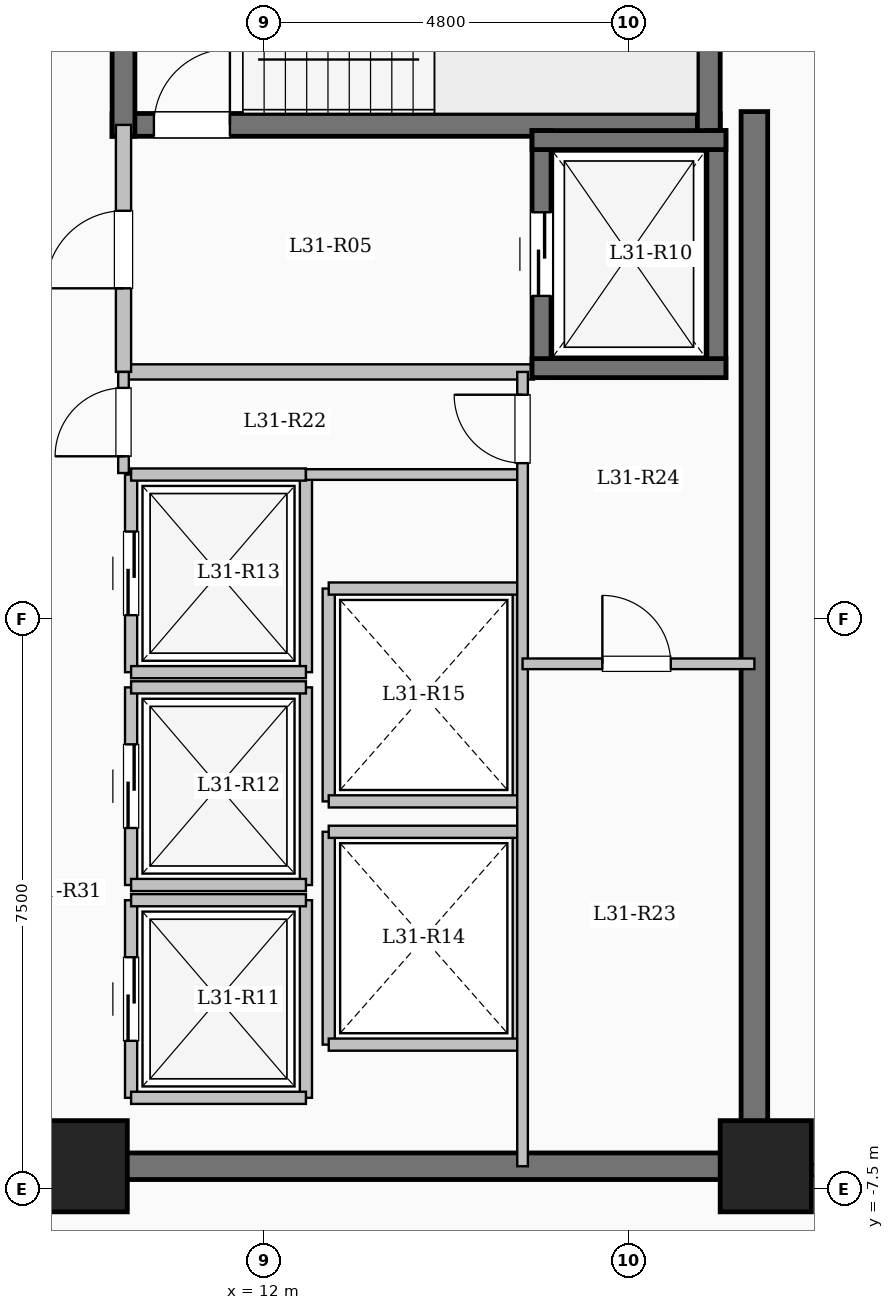
"""IFC4 building model, lengths in metres.
Left out: names, types, materials, properties, quantities, classifications, styles, units other than length and angle.
Written with IfcOpenShell. Run it as: python <this file> out.ifc"""

import sys

from ifc_helpers import new_model, si_unit, direction, frame, frame_2d, origin, origin_2d, place, context, subcontext, project, spatial, rectangle, extrude, element, fill, save


model = new_model("IFC4")
c1 = context("Model", 3, precision=1e-05, world=origin(), true_north=direction((0.0, 1.0)))
c2 = subcontext(c1, "Body", "Model", "MODEL_VIEW")
j1 = project(units=[si_unit("LENGTHUNIT", "METRE"), si_unit("PLANEANGLEUNIT", "RADIAN")], contexts=[c1])
p1 = place(None, origin())
s1 = spatial("IfcSite", under=j1, at=p1, CompositionType="ELEMENT")
p2 = place(p1, origin())
s2 = spatial("IfcBuilding", under=s1, at=p2, CompositionType="ELEMENT")
p3 = place(p2, frame((0.0, 0.0, 115.15)))
s3 = spatial("IfcBuildingStorey", under=s2, at=p3, CompositionType="ELEMENT", Elevation=115.15)
for number, where, z_axis, x_axis in (
    (1, (9.6, -7.2, 0.0), (0.0, 0.0, 1.0), (1.0, 0.0, 0.0)),
    (2, (18.6, -7.2, 0.0), (0.0, 0.0, 1.0), (1.0, 0.0, 0.0)),
):
    element("IfcColumn", number, at=place(p3, frame(where, z_axis=z_axis, x_axis=x_axis)), inside=s3, PredefinedType="COLUMN", context=c2, shape_type="SweptSolid", body=[
        extrude(rectangle(XDim=1.2, YDim=1.2, at=origin_2d()), origin(), (0.0, 0.0, 1.0), 3.35),
    ])
p4 = place(p3, frame((10.0, 6.5, 0.0), z_axis=(0.0, 0.0, 1.0), x_axis=(1.0, 0.0, 0.0)))
e3 = element("IfcWall", 3, at=p4, inside=s3, PredefinedType="SHEAR", context=c2, shape_type="SweptSolid", body=[
    extrude(rectangle(XDim=8.0, YDim=0.3, at=frame_2d((4.0, 0.0))), origin(), (0.0, 0.0, 1.0), 3.35),
])
p5 = place(p4, frame((0.55, 0.0, 0.0)))
e4 = element("IfcOpeningElement", 4, at=p5, cuts=e3, PredefinedType="OPENING", context=c2, shape_type="SweptSolid", body=[
    extrude(rectangle(XDim=1.0, YDim=2.15, at=frame_2d((0.5, 1.075))), frame((0.0, 0.16, 0.0), z_axis=(0.0, -1.0, 0.0), x_axis=(1.0, 0.0, 0.0)), (0.0, 0.0, 1.0), 0.32),
])
for number, where, z_axis, x_axis in (
    (5, (10.15, 6.35, 0.0), (0.0, 0.0, 1.0), (0.0, 1.0, 0.0)),
    (6, (17.85, 6.35, 0.0), (0.0, 0.0, 1.0), (0.0, 1.0, 0.0)),
):
    element("IfcWall", number, at=place(p3, frame(where, z_axis=z_axis, x_axis=x_axis)), inside=s3, PredefinedType="SHEAR", context=c2, shape_type="SweptSolid", body=[
        extrude(rectangle(XDim=3.59, YDim=0.3, at=frame_2d((1.795, 0.0))), origin(), (0.0, 0.0, 1.0), 3.35),
    ])
p6 = place(p3, frame((10.15, 3.25, 0.0), z_axis=(0.0, 0.0, 1.0), x_axis=(1.0, 0.0, 0.0)))
e7 = element("IfcWall", 7, at=p6, inside=s3, PredefinedType="SOLIDWALL", context=c2, shape_type="SweptSolid", body=[
    extrude(rectangle(XDim=5.4, YDim=0.2, at=frame_2d((2.7, 0.0))), origin(), (0.0, 0.0, 1.0), 3.05),
])
p7 = place(p3, frame((10.15, 3.25, 0.0), z_axis=(0.0, 0.0, 1.0), x_axis=(0.0, 1.0, 0.0)))
e8 = element("IfcWall", 8, at=p7, inside=s3, PredefinedType="SOLIDWALL", context=c2, shape_type="SweptSolid", body=[
    extrude(rectangle(XDim=3.25, YDim=0.2, at=frame_2d((1.625, 0.0))), origin(), (0.0, 0.0, 1.0), 3.05),
])
p8 = place(p7, frame((1.1, 0.0, 0.0)))
e9 = element("IfcOpeningElement", 9, at=p8, cuts=e8, PredefinedType="OPENING", context=c2, shape_type="SweptSolid", body=[
    extrude(rectangle(XDim=1.02, YDim=2.15, at=frame_2d((0.51, 1.075))), frame((0.0, 0.11, 0.0), z_axis=(0.0, -1.0, 0.0), x_axis=(1.0, 0.0, 0.0)), (0.0, 0.0, 1.0), 0.22),
])
p9 = place(p3, frame((15.65, 3.175, 0.0), z_axis=(0.0, 0.0, 1.0), x_axis=(0.0, 1.0, 0.0)))
e10 = element("IfcWall", 10, at=p9, inside=s3, PredefinedType="SHEAR", context=c2, shape_type="SweptSolid", body=[
    extrude(rectangle(XDim=3.25, YDim=0.25, at=frame_2d((1.625, 0.0))), origin(), (0.0, 0.0, 1.0), 3.35),
])
p10 = place(p9, frame((1.075, 0.0, 0.0)))
e11 = element("IfcOpeningElement", 11, at=p10, cuts=e10, PredefinedType="OPENING", context=c2, shape_type="SweptSolid", body=[
    extrude(rectangle(XDim=1.1, YDim=2.15, at=frame_2d((0.55, 1.075))), frame((0.0, 0.135, 0.0), z_axis=(0.0, -1.0, 0.0), x_axis=(1.0, 0.0, 0.0)), (0.0, 0.0, 1.0), 0.27),
])
p11 = place(p3, frame((17.95, 3.175, 0.0), z_axis=(0.0, 0.0, 1.0), x_axis=(0.0, 1.0, 0.0)))
e12 = element("IfcWall", 12, at=p11, inside=s3, PredefinedType="SHEAR", context=c2, shape_type="SweptSolid", body=[
    extrude(rectangle(XDim=3.25, YDim=0.25, at=frame_2d((1.625, 0.0))), origin(), (0.0, 0.0, 1.0), 3.35),
])
for number, where, z_axis, x_axis in (
    (13, (15.525, 3.3, 0.0), (0.0, 0.0, 1.0), (1.0, 0.0, 0.0)),
    (14, (15.525, 6.3, 0.0), (0.0, 0.0, 1.0), (1.0, 0.0, 0.0)),
):
    element("IfcWall", number, at=place(p3, frame(where, z_axis=z_axis, x_axis=x_axis)), inside=s3, PredefinedType="SHEAR", context=c2, shape_type="SweptSolid", body=[
        extrude(rectangle(XDim=2.55, YDim=0.25, at=frame_2d((1.275, 0.0))), origin(), (0.0, 0.0, 1.0), 3.35),
    ])
p12 = place(p3, frame((10.25, -6.3, 0.0), z_axis=(0.0, 0.0, 1.0), x_axis=(0.0, 1.0, 0.0)))
e15 = element("IfcWall", 15, at=p12, inside=s3, PredefinedType="SOLIDWALL", context=c2, shape_type="SweptSolid", body=[
    extrude(rectangle(XDim=2.6, YDim=0.16, at=frame_2d((1.3, 0.0))), origin(), (0.0, 0.0, 1.0), 3.05),
])
p13 = place(p12, frame((0.75, 0.0, 0.0)))
e16 = element("IfcOpeningElement", 16, at=p13, cuts=e15, PredefinedType="OPENING", context=c2, shape_type="SweptSolid", body=[
    extrude(rectangle(XDim=1.1, YDim=2.15, at=frame_2d((0.55, 1.075))), frame((0.0, 0.09, 0.0), z_axis=(0.0, -1.0, 0.0), x_axis=(1.0, 0.0, 0.0)), (0.0, 0.0, 1.0), 0.18),
])
p14 = place(p3, frame((12.55, -6.3, 0.0), z_axis=(0.0, 0.0, 1.0), x_axis=(0.0, 1.0, 0.0)))
e17 = element("IfcWall", 17, at=p14, inside=s3, PredefinedType="SOLIDWALL", context=c2, shape_type="SweptSolid", body=[
    extrude(rectangle(XDim=2.6, YDim=0.16, at=frame_2d((1.3, 0.0))), origin(), (0.0, 0.0, 1.0), 3.05),
])
for number, where, z_axis, x_axis in (
    (18, (10.25, -6.3, 0.0), (0.0, 0.0, 1.0), (1.0, 0.0, 0.0)),
    (19, (10.25, -3.7, 0.0), (0.0, 0.0, 1.0), (1.0, 0.0, 0.0)),
):
    element("IfcWall", number, at=place(p3, frame(where, z_axis=z_axis, x_axis=x_axis)), inside=s3, PredefinedType="SOLIDWALL", context=c2, shape_type="SweptSolid", body=[
        extrude(rectangle(XDim=2.3, YDim=0.16, at=frame_2d((1.15, 0.0))), origin(), (0.0, 0.0, 1.0), 3.05),
    ])
p15 = place(p3, frame((10.25, -3.5, 0.0), z_axis=(0.0, 0.0, 1.0), x_axis=(0.0, 1.0, 0.0)))
e20 = element("IfcWall", 20, at=p15, inside=s3, PredefinedType="SOLIDWALL", context=c2, shape_type="SweptSolid", body=[
    extrude(rectangle(XDim=2.6, YDim=0.16, at=frame_2d((1.3, 0.0))), origin(), (0.0, 0.0, 1.0), 3.05),
])
p16 = place(p15, frame((0.75, 0.0, 0.0)))
e21 = element("IfcOpeningElement", 21, at=p16, cuts=e20, PredefinedType="OPENING", context=c2, shape_type="SweptSolid", body=[
    extrude(rectangle(XDim=1.1, YDim=2.15, at=frame_2d((0.55, 1.075))), frame((0.0, 0.09, 0.0), z_axis=(0.0, -1.0, 0.0), x_axis=(1.0, 0.0, 0.0)), (0.0, 0.0, 1.0), 0.18),
])
p17 = place(p3, frame((12.55, -3.5, 0.0), z_axis=(0.0, 0.0, 1.0), x_axis=(0.0, 1.0, 0.0)))
e22 = element("IfcWall", 22, at=p17, inside=s3, PredefinedType="SOLIDWALL", context=c2, shape_type="SweptSolid", body=[
    extrude(rectangle(XDim=2.6, YDim=0.16, at=frame_2d((1.3, 0.0))), origin(), (0.0, 0.0, 1.0), 3.05),
])
for number, where, z_axis, x_axis in (
    (23, (10.25, -3.5, 0.0), (0.0, 0.0, 1.0), (1.0, 0.0, 0.0)),
    (24, (10.25, -0.9, 0.0), (0.0, 0.0, 1.0), (1.0, 0.0, 0.0)),
):
    element("IfcWall", number, at=place(p3, frame(where, z_axis=z_axis, x_axis=x_axis)), inside=s3, PredefinedType="SOLIDWALL", context=c2, shape_type="SweptSolid", body=[
        extrude(rectangle(XDim=2.3, YDim=0.16, at=frame_2d((1.15, 0.0))), origin(), (0.0, 0.0, 1.0), 3.05),
    ])
p18 = place(p3, frame((10.25, -0.7, 0.0), z_axis=(0.0, 0.0, 1.0), x_axis=(0.0, 1.0, 0.0)))
e25 = element("IfcWall", 25, at=p18, inside=s3, PredefinedType="SOLIDWALL", context=c2, shape_type="SweptSolid", body=[
    extrude(rectangle(XDim=2.6, YDim=0.16, at=frame_2d((1.3, 0.0))), origin(), (0.0, 0.0, 1.0), 3.05),
])
p19 = place(p18, frame((0.75, 0.0, 0.0)))
e26 = element("IfcOpeningElement", 26, at=p19, cuts=e25, PredefinedType="OPENING", context=c2, shape_type="SweptSolid", body=[
    extrude(rectangle(XDim=1.1, YDim=2.15, at=frame_2d((0.55, 1.075))), frame((0.0, 0.09, 0.0), z_axis=(0.0, -1.0, 0.0), x_axis=(1.0, 0.0, 0.0)), (0.0, 0.0, 1.0), 0.18),
])
p20 = place(p3, frame((12.55, -0.7, 0.0), z_axis=(0.0, 0.0, 1.0), x_axis=(0.0, 1.0, 0.0)))
e27 = element("IfcWall", 27, at=p20, inside=s3, PredefinedType="SOLIDWALL", context=c2, shape_type="SweptSolid", body=[
    extrude(rectangle(XDim=2.6, YDim=0.16, at=frame_2d((1.3, 0.0))), origin(), (0.0, 0.0, 1.0), 3.05),
])
for number, where, z_axis, x_axis in (
    (28, (10.25, -0.7, 0.0), (0.0, 0.0, 1.0), (1.0, 0.0, 0.0)),
    (29, (10.25, 1.9, 0.0), (0.0, 0.0, 1.0), (1.0, 0.0, 0.0)),
):
    element("IfcWall", number, at=place(p3, frame(where, z_axis=z_axis, x_axis=x_axis)), inside=s3, PredefinedType="SOLIDWALL", context=c2, shape_type="SweptSolid", body=[
        extrude(rectangle(XDim=2.3, YDim=0.16, at=frame_2d((1.15, 0.0))), origin(), (0.0, 0.0, 1.0), 3.05),
    ])
for number, where, z_axis, x_axis in (
    (30, (12.85, -5.6, 0.0), (0.0, 0.0, 1.0), (0.0, 1.0, 0.0)),
    (31, (15.35, -5.6, 0.0), (0.0, 0.0, 1.0), (0.0, 1.0, 0.0)),
):
    element("IfcWall", number, at=place(p3, frame(where, z_axis=z_axis, x_axis=x_axis)), inside=s3, PredefinedType="SOLIDWALL", context=c2, shape_type="SweptSolid", body=[
        extrude(rectangle(XDim=2.8, YDim=0.16, at=frame_2d((1.4, 0.0))), origin(), (0.0, 0.0, 1.0), 3.05),
    ])
for number, where, z_axis, x_axis in (
    (32, (12.85, -5.6, 0.0), (0.0, 0.0, 1.0), (1.0, 0.0, 0.0)),
    (33, (12.85, -2.8, 0.0), (0.0, 0.0, 1.0), (1.0, 0.0, 0.0)),
):
    element("IfcWall", number, at=place(p3, frame(where, z_axis=z_axis, x_axis=x_axis)), inside=s3, PredefinedType="SOLIDWALL", context=c2, shape_type="SweptSolid", body=[
        extrude(rectangle(XDim=2.5, YDim=0.16, at=frame_2d((1.25, 0.0))), origin(), (0.0, 0.0, 1.0), 3.05),
    ])
for number, where, z_axis, x_axis in (
    (34, (12.85, -2.4, 0.0), (0.0, 0.0, 1.0), (0.0, 1.0, 0.0)),
    (35, (15.35, -2.4, 0.0), (0.0, 0.0, 1.0), (0.0, 1.0, 0.0)),
):
    element("IfcWall", number, at=place(p3, frame(where, z_axis=z_axis, x_axis=x_axis)), inside=s3, PredefinedType="SOLIDWALL", context=c2, shape_type="SweptSolid", body=[
        extrude(rectangle(XDim=2.8, YDim=0.16, at=frame_2d((1.4, 0.0))), origin(), (0.0, 0.0, 1.0), 3.05),
    ])
for number, where, z_axis, x_axis in (
    (36, (12.85, -2.4, 0.0), (0.0, 0.0, 1.0), (1.0, 0.0, 0.0)),
    (37, (12.85, 0.4, 0.0), (0.0, 0.0, 1.0), (1.0, 0.0, 0.0)),
):
    element("IfcWall", number, at=place(p3, frame(where, z_axis=z_axis, x_axis=x_axis)), inside=s3, PredefinedType="SOLIDWALL", context=c2, shape_type="SweptSolid", body=[
        extrude(rectangle(XDim=2.5, YDim=0.16, at=frame_2d((1.25, 0.0))), origin(), (0.0, 0.0, 1.0), 3.05),
    ])
p21 = place(p3, frame((18.45, -7.375, 0.0), z_axis=(0.0, 0.0, 1.0), x_axis=(0.0, 1.0, 0.0)))
e38 = element("IfcWall", 38, at=p21, inside=s3, PredefinedType="SHEAR", context=c2, shape_type="SweptSolid", body=[
    extrude(rectangle(XDim=14.05, YDim=0.35, at=frame_2d((7.025, 0.0))), origin(), (0.0, 0.0, 1.0), 3.35),
])
p22 = place(p3, frame((10.075, -7.2, 0.0), z_axis=(0.0, 0.0, 1.0), x_axis=(1.0, 0.0, 0.0)))
e39 = element("IfcWall", 39, at=p22, inside=s3, PredefinedType="SHEAR", context=c2, shape_type="SweptSolid", body=[
    extrude(rectangle(XDim=8.55, YDim=0.35, at=frame_2d((4.275, 0.0))), origin(), (0.0, 0.0, 1.0), 3.35),
])
p23 = place(p3, frame((12.55, 1.9, 0.0), z_axis=(0.0, 0.0, 1.0), x_axis=(1.0, 0.0, 0.0)))
e40 = element("IfcWall", 40, at=p23, inside=s3, PredefinedType="PARTITIONING", context=c2, shape_type="SweptSolid", body=[
    extrude(rectangle(XDim=2.85, YDim=0.14, at=frame_2d((1.425, 0.0))), origin(), (0.0, 0.0, 1.0), 3.05),
])
p24 = place(p3, frame((10.15, 1.92, 0.0), z_axis=(0.0, 0.0, 1.0), x_axis=(0.0, 1.0, 0.0)))
e41 = element("IfcWall", 41, at=p24, inside=s3, PredefinedType="PARTITIONING", context=c2, shape_type="SweptSolid", body=[
    extrude(rectangle(XDim=1.33, YDim=0.14, at=frame_2d((0.665, 0.0))), origin(), (0.0, 0.0, 1.0), 3.05),
])
p25 = place(p24, frame((0.22, 0.0, 0.0)))
e42 = element("IfcOpeningElement", 42, at=p25, cuts=e41, PredefinedType="OPENING", context=c2, shape_type="SweptSolid", body=[
    extrude(rectangle(XDim=0.9, YDim=2.08, at=frame_2d((0.45, 1.04))), frame((0.0, 0.08, 0.0), z_axis=(0.0, -1.0, 0.0), x_axis=(1.0, 0.0, 0.0)), (0.0, 0.0, 1.0), 0.16),
])
p26 = place(p3, frame((15.4, -7.2, 0.0), z_axis=(0.0, 0.0, 1.0), x_axis=(0.0, 1.0, 0.0)))
e43 = element("IfcWall", 43, at=p26, inside=s3, PredefinedType="PARTITIONING", context=c2, shape_type="SweptSolid", body=[
    extrude(rectangle(XDim=10.45, YDim=0.14, at=frame_2d((5.225, 0.0))), origin(), (0.0, 0.0, 1.0), 3.05),
])
p27 = place(p26, frame((9.25, 0.0, 0.0)))
e44 = element("IfcOpeningElement", 44, at=p27, cuts=e43, PredefinedType="OPENING", context=c2, shape_type="SweptSolid", body=[
    extrude(rectangle(XDim=0.9, YDim=2.08, at=frame_2d((0.45, 1.04))), frame((0.0, 0.08, 0.0), z_axis=(0.0, -1.0, 0.0), x_axis=(1.0, 0.0, 0.0)), (0.0, 0.0, 1.0), 0.16),
])
p28 = place(p3, frame((15.4, -0.59, 0.0), z_axis=(0.0, 0.0, 1.0), x_axis=(1.0, 0.0, 0.0)))
e45 = element("IfcWall", 45, at=p28, inside=s3, PredefinedType="PARTITIONING", context=c2, shape_type="SweptSolid", body=[
    extrude(rectangle(XDim=3.05, YDim=0.14, at=frame_2d((1.525, 0.0))), origin(), (0.0, 0.0, 1.0), 3.05),
])
p29 = place(p28, frame((1.05, 0.0, 0.0)))
e46 = element("IfcOpeningElement", 46, at=p29, cuts=e45, PredefinedType="OPENING", context=c2, shape_type="SweptSolid", body=[
    extrude(rectangle(XDim=0.9, YDim=2.08, at=frame_2d((0.45, 1.04))), frame((0.0, 0.08, 0.0), z_axis=(0.0, -1.0, 0.0), x_axis=(1.0, 0.0, 0.0)), (0.0, 0.0, 1.0), 0.16),
])
p30 = place(p3, frame((18.45, -7.25, 0.0), z_axis=(0.0, 0.0, 1.0), x_axis=(1.0, 0.0, 0.0)))
e47 = element("IfcWall", 47, at=p30, inside=s3, PredefinedType="PARTITIONING", context=c2, shape_type="SweptSolid", body=[
    extrude(rectangle(XDim=8.43, YDim=0.15, at=frame_2d((4.215, 0.0))), origin(), (0.0, 0.0, 1.0), 3.05),
])
p31 = place(p30, frame((1.95, 0.0, 0.0)))
e48 = element("IfcOpeningElement", 48, at=p31, cuts=e47, PredefinedType="OPENING", context=c2, shape_type="SweptSolid", body=[
    extrude(rectangle(XDim=1.08, YDim=2.15, at=frame_2d((0.54, 1.075))), frame((0.0, 0.085, 0.0), z_axis=(0.0, -1.0, 0.0), x_axis=(1.0, 0.0, 0.0)), (0.0, 0.0, 1.0), 0.17),
])
p32 = place(p5, origin())
e49 = element("IfcDoor", 49, at=p32, inside=s3, OperationType="SINGLE_SWING_RIGHT", PredefinedType="DOOR", context=c2, shape_type="SweptSolid", body=[
    extrude(rectangle(XDim=1.0, YDim=2.15, at=frame_2d((0.5, 1.075))), frame((0.0, 0.025, 0.0), z_axis=(0.0, -1.0, 0.0), x_axis=(1.0, 0.0, 0.0)), (0.0, 0.0, 1.0), 0.05),
])
fill(e4, e49)
p33 = place(p8, origin())
e50 = element("IfcDoor", 50, at=p33, inside=s3, OperationType="SINGLE_SWING_LEFT", PredefinedType="DOOR", context=c2, shape_type="SweptSolid", body=[
    extrude(rectangle(XDim=1.02, YDim=2.15, at=frame_2d((0.51, 1.075))), frame((0.0, 0.025, 0.0), z_axis=(0.0, -1.0, 0.0), x_axis=(1.0, 0.0, 0.0)), (0.0, 0.0, 1.0), 0.05),
])
fill(e9, e50)
p34 = place(p10, origin())
e51 = element("IfcDoor", 51, at=p34, inside=s3, OperationType="SLIDING_TO_LEFT", PredefinedType="DOOR", context=c2, shape_type="SweptSolid", body=[
    extrude(rectangle(XDim=1.1, YDim=2.15, at=frame_2d((0.55, 1.075))), frame((0.0, 0.025, 0.0), z_axis=(0.0, -1.0, 0.0), x_axis=(1.0, 0.0, 0.0)), (0.0, 0.0, 1.0), 0.05),
])
fill(e11, e51)
p35 = place(p13, origin())
e52 = element("IfcDoor", 52, at=p35, inside=s3, OperationType="SLIDING_TO_LEFT", PredefinedType="DOOR", context=c2, shape_type="SweptSolid", body=[
    extrude(rectangle(XDim=1.1, YDim=2.15, at=frame_2d((0.55, 1.075))), frame((0.0, 0.025, 0.0), z_axis=(0.0, -1.0, 0.0), x_axis=(1.0, 0.0, 0.0)), (0.0, 0.0, 1.0), 0.05),
])
fill(e16, e52)
p36 = place(p16, origin())
e53 = element("IfcDoor", 53, at=p36, inside=s3, OperationType="SLIDING_TO_LEFT", PredefinedType="DOOR", context=c2, shape_type="SweptSolid", body=[
    extrude(rectangle(XDim=1.1, YDim=2.15, at=frame_2d((0.55, 1.075))), frame((0.0, 0.025, 0.0), z_axis=(0.0, -1.0, 0.0), x_axis=(1.0, 0.0, 0.0)), (0.0, 0.0, 1.0), 0.05),
])
fill(e21, e53)
p37 = place(p19, origin())
e54 = element("IfcDoor", 54, at=p37, inside=s3, OperationType="SLIDING_TO_LEFT", PredefinedType="DOOR", context=c2, shape_type="SweptSolid", body=[
    extrude(rectangle(XDim=1.1, YDim=2.15, at=frame_2d((0.55, 1.075))), frame((0.0, 0.025, 0.0), z_axis=(0.0, -1.0, 0.0), x_axis=(1.0, 0.0, 0.0)), (0.0, 0.0, 1.0), 0.05),
])
fill(e26, e54)
p38 = place(p25, origin())
e55 = element("IfcDoor", 55, at=p38, inside=s3, OperationType="SINGLE_SWING_LEFT", PredefinedType="DOOR", context=c2, shape_type="SweptSolid", body=[
    extrude(rectangle(XDim=0.9, YDim=2.08, at=frame_2d((0.45, 1.04))), frame((0.0, 0.025, 0.0), z_axis=(0.0, -1.0, 0.0), x_axis=(1.0, 0.0, 0.0)), (0.0, 0.0, 1.0), 0.05),
])
fill(e42, e55)
p39 = place(p27, origin())
e56 = element("IfcDoor", 56, at=p39, inside=s3, OperationType="SINGLE_SWING_RIGHT", PredefinedType="DOOR", context=c2, shape_type="SweptSolid", body=[
    extrude(rectangle(XDim=0.9, YDim=2.08, at=frame_2d((0.45, 1.04))), frame((0.0, 0.025, 0.0), z_axis=(0.0, -1.0, 0.0), x_axis=(1.0, 0.0, 0.0)), (0.0, 0.0, 1.0), 0.05),
])
fill(e44, e56)
p40 = place(p29, origin())
e57 = element("IfcDoor", 57, at=p40, inside=s3, OperationType="SINGLE_SWING_LEFT", PredefinedType="DOOR", context=c2, shape_type="SweptSolid", body=[
    extrude(rectangle(XDim=0.9, YDim=2.08, at=frame_2d((0.45, 1.04))), frame((0.0, 0.025, 0.0), z_axis=(0.0, -1.0, 0.0), x_axis=(1.0, 0.0, 0.0)), (0.0, 0.0, 1.0), 0.05),
])
fill(e46, e57)
save(model, sys.argv[1])
